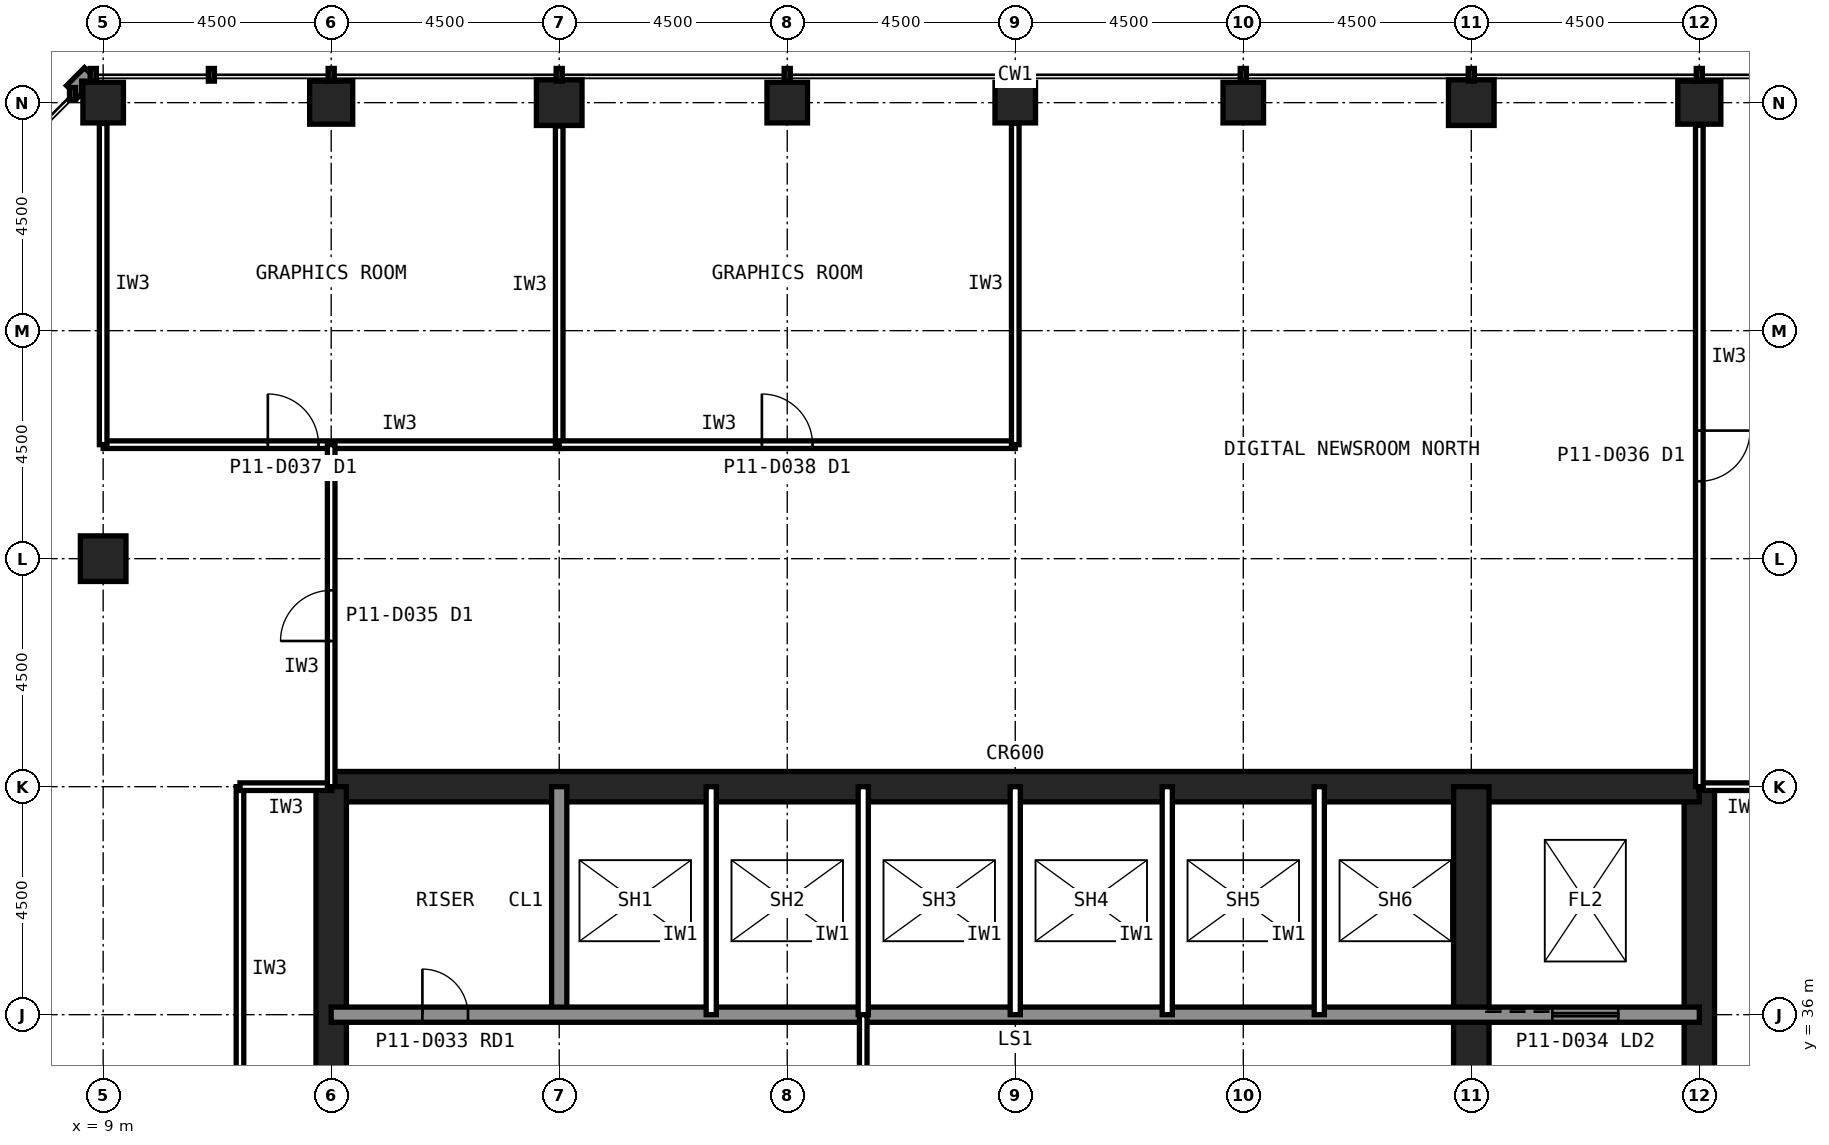
"""IFC4 building model, lengths in metres.
Left out: names, types, materials, properties, quantities, classifications, styles, units other than length and angle.
Written with IfcOpenShell. Run it as: python <this file> out.ifc"""

import sys

from ifc_helpers import new_model, si_unit, direction, frame, frame_2d, origin, origin_2d, place, context, subcontext, project, spatial, rectangle, hollow_rectangle, extrude, element, fill, save


model = new_model("IFC4")
c1 = context("Model", 3, precision=1e-05, world=origin(), true_north=direction((0.0, 1.0)))
c2 = subcontext(c1, "Body", "Model", "MODEL_VIEW")
j1 = project(units=[si_unit("LENGTHUNIT", "METRE"), si_unit("PLANEANGLEUNIT", "RADIAN")], contexts=[c1])
p1 = place(None, origin())
s1 = spatial("IfcSite", under=j1, at=p1, CompositionType="ELEMENT")
p2 = place(p1, origin())
s2 = spatial("IfcBuilding", under=s1, at=p2, CompositionType="ELEMENT")
p3 = place(p2, frame((0.0, 0.0, 45.8)))
s3 = spatial("IfcBuildingStorey", under=s2, at=p3, CompositionType="ELEMENT", Elevation=45.8)
p4 = place(p3, frame((40.5, 54.0, 0.0), z_axis=(0.0, 0.0, 1.0), x_axis=(1.0, 0.0, 0.0)))
e1 = element("IfcColumn", 1, at=p4, inside=s3, PredefinedType="COLUMN", context=c2, shape_type="SweptSolid", body=[
    extrude(hollow_rectangle(XDim=0.85, YDim=0.85, WallThickness=0.05, at=origin_2d()), origin(), (0.0, 0.0, 1.0), 4.2),
])
p5 = place(p3, frame((36.0, 54.0, 0.0), z_axis=(0.0, 0.0, 1.0), x_axis=(1.0, 0.0, 0.0)))
e2 = element("IfcColumn", 2, at=p5, inside=s3, PredefinedType="COLUMN", context=c2, shape_type="SweptSolid", body=[
    extrude(hollow_rectangle(XDim=0.9, YDim=0.9, WallThickness=0.063, at=origin_2d()), origin(), (0.0, 0.0, 1.0), 4.2),
])
for number, where, z_axis, x_axis in (
    (3, (31.5, 54.0, 0.0), (0.0, 0.0, 1.0), (1.0, 0.0, 0.0)),
    (4, (27.0, 54.0, 0.0), (0.0, 0.0, 1.0), (1.0, 0.0, 0.0)),
    (5, (22.5, 54.0, 0.0), (0.0, 0.0, 1.0), (1.0, 0.0, 0.0)),
):
    element("IfcColumn", number, at=place(p3, frame(where, z_axis=z_axis, x_axis=x_axis)), inside=s3, PredefinedType="COLUMN", context=c2, shape_type="SweptSolid", body=[
        extrude(hollow_rectangle(XDim=0.8, YDim=0.8, WallThickness=0.045, at=origin_2d()), origin(), (0.0, 0.0, 1.0), 4.2),
    ])
p6 = place(p3, frame((18.0, 54.0, 0.0), z_axis=(0.0, 0.0, 1.0), x_axis=(1.0, 0.0, 0.0)))
e6 = element("IfcColumn", 6, at=p6, inside=s3, PredefinedType="COLUMN", context=c2, shape_type="SweptSolid", body=[
    extrude(hollow_rectangle(XDim=0.9, YDim=0.9, WallThickness=0.063, at=origin_2d()), origin(), (0.0, 0.0, 1.0), 4.2),
])
p7 = place(p3, frame((13.5, 54.0, 0.0), z_axis=(0.0, 0.0, 1.0), x_axis=(1.0, 0.0, 0.0)))
e7 = element("IfcColumn", 7, at=p7, inside=s3, PredefinedType="COLUMN", context=c2, shape_type="SweptSolid", body=[
    extrude(hollow_rectangle(XDim=0.85, YDim=0.85, WallThickness=0.05, at=origin_2d()), origin(), (0.0, 0.0, 1.0), 4.2),
])
p8 = place(p3, frame((9.0, 54.0, 0.0), z_axis=(0.0, 0.0, 1.0), x_axis=(1.0, 0.0, 0.0)))
e8 = element("IfcColumn", 8, at=p8, inside=s3, PredefinedType="COLUMN", context=c2, shape_type="SweptSolid", body=[
    extrude(hollow_rectangle(XDim=0.8, YDim=0.8, WallThickness=0.045, at=origin_2d()), origin(), (0.0, 0.0, 1.0), 4.2),
])
p9 = place(p3, frame((9.0, 45.0, 0.0), z_axis=(0.0, 0.0, 1.0), x_axis=(1.0, 0.0, 0.0)))
e9 = element("IfcColumn", 9, at=p9, inside=s3, PredefinedType="COLUMN", context=c2, shape_type="SweptSolid", body=[
    extrude(hollow_rectangle(XDim=0.9, YDim=0.9, WallThickness=0.063, at=origin_2d()), origin(), (0.0, 0.0, 1.0), 4.2),
])
p10 = place(p3, frame((40.5, 13.5, 0.0), z_axis=(0.0, 0.0, 1.0), x_axis=(0.0, 1.0, 0.0)))
e10 = element("IfcWall", 10, at=p10, inside=s3, PredefinedType="SHEAR", context=c2, shape_type="SweptSolid", body=[
    extrude(rectangle(XDim=27.0, YDim=0.6, at=frame_2d((13.5, 0.0))), origin(), (0.0, 0.0, 1.0), 4.2),
])
p11 = place(p10, frame((5.85, 0.0, 0.0)))
e11 = element("IfcOpeningElement", 11, at=p11, cuts=e10, PredefinedType="OPENING", context=c2, shape_type="SweptSolid", body=[
    extrude(rectangle(XDim=1.8, YDim=2.1, at=frame_2d((0.9, 1.05))), frame((0.0, 0.31, 0.0), z_axis=(0.0, -1.0, 0.0), x_axis=(1.0, 0.0, 0.0)), (0.0, 0.0, 1.0), 0.62),
])
p12 = place(p10, frame((19.65, 0.0, 0.0)))
e12 = element("IfcOpeningElement", 12, at=p12, cuts=e10, PredefinedType="OPENING", context=c2, shape_type="SweptSolid", body=[
    extrude(rectangle(XDim=1.2, YDim=2.1, at=frame_2d((0.6, 1.05))), frame((0.0, 0.31, 0.0), z_axis=(0.0, -1.0, 0.0), x_axis=(1.0, 0.0, 0.0)), (0.0, 0.0, 1.0), 0.62),
])
p13 = place(p3, frame((40.5, 40.5, 0.0), z_axis=(0.0, 0.0, 1.0), x_axis=(-1.0, 0.0, 0.0)))
e13 = element("IfcWall", 13, at=p13, inside=s3, PredefinedType="SHEAR", context=c2, shape_type="SweptSolid", body=[
    extrude(rectangle(XDim=27.0, YDim=0.6, at=frame_2d((13.5, 0.0))), origin(), (0.0, 0.0, 1.0), 4.2),
])
p14 = place(p3, frame((13.5, 40.5, 0.0), z_axis=(0.0, 0.0, 1.0), x_axis=(0.0, -1.0, 0.0)))
e14 = element("IfcWall", 14, at=p14, inside=s3, PredefinedType="SHEAR", context=c2, shape_type="SweptSolid", body=[
    extrude(rectangle(XDim=27.0, YDim=0.6, at=frame_2d((13.5, 0.0))), origin(), (0.0, 0.0, 1.0), 4.2),
])
p15 = place(p14, frame((19.65, 0.0, 0.0)))
e15 = element("IfcOpeningElement", 15, at=p15, cuts=e14, PredefinedType="OPENING", context=c2, shape_type="SweptSolid", body=[
    extrude(rectangle(XDim=1.2, YDim=2.1, at=frame_2d((0.6, 1.05))), frame((0.0, 0.31, 0.0), z_axis=(0.0, -1.0, 0.0), x_axis=(1.0, 0.0, 0.0)), (0.0, 0.0, 1.0), 0.62),
])
p16 = place(p14, frame((5.85, 0.0, 0.0)))
e16 = element("IfcOpeningElement", 16, at=p16, cuts=e14, PredefinedType="OPENING", context=c2, shape_type="SweptSolid", body=[
    extrude(rectangle(XDim=1.8, YDim=2.1, at=frame_2d((0.9, 1.05))), frame((0.0, 0.31, 0.0), z_axis=(0.0, -1.0, 0.0), x_axis=(1.0, 0.0, 0.0)), (0.0, 0.0, 1.0), 0.62),
])
p17 = place(p3, frame((18.0, 36.0, 0.0), z_axis=(0.0, 0.0, 1.0), x_axis=(0.0, 1.0, 0.0)))
e17 = element("IfcWall", 17, at=p17, inside=s3, PredefinedType="SOLIDWALL", context=c2, shape_type="SweptSolid", body=[
    extrude(rectangle(XDim=4.5, YDim=0.3, at=frame_2d((2.25, 0.0))), origin(), (0.0, 0.0, 1.0), 4.04),
])
p18 = place(p3, frame((36.0, 22.5, 0.0), z_axis=(0.0, 0.0, 1.0), x_axis=(0.0, 1.0, 0.0)))
e18 = element("IfcWall", 18, at=p18, inside=s3, PredefinedType="SHEAR", context=c2, shape_type="SweptSolid", body=[
    extrude(rectangle(XDim=18.0, YDim=0.7, at=frame_2d((9.0, 0.0))), origin(), (0.0, 0.0, 1.0), 4.2),
])
p19 = place(p3, frame((13.5, 36.0, 0.0), z_axis=(0.0, 0.0, 1.0), x_axis=(1.0, 0.0, 0.0)))
e19 = element("IfcWall", 19, at=p19, inside=s3, PredefinedType="SOLIDWALL", context=c2, shape_type="SweptSolid", body=[
    extrude(rectangle(XDim=27.0, YDim=0.3, at=frame_2d((13.5, 0.0))), origin(), (0.0, 0.0, 1.0), 4.04),
])
p20 = place(p19, frame((1.8, 0.0, 0.0)))
e20 = element("IfcOpeningElement", 20, at=p20, cuts=e19, PredefinedType="OPENING", context=c2, shape_type="SweptSolid", body=[
    extrude(rectangle(XDim=0.9, YDim=2.1, at=frame_2d((0.45, 1.05))), frame((0.0, 0.16, 0.0), z_axis=(0.0, -1.0, 0.0), x_axis=(1.0, 0.0, 0.0)), (0.0, 0.0, 1.0), 0.32),
])
p21 = place(p19, frame((24.1, 0.0, 0.0)))
e21 = element("IfcOpeningElement", 21, at=p21, cuts=e19, PredefinedType="OPENING", context=c2, shape_type="SweptSolid", body=[
    extrude(rectangle(XDim=1.3, YDim=2.2, at=frame_2d((0.65, 1.1))), frame((0.0, 0.16, 0.0), z_axis=(0.0, -1.0, 0.0), x_axis=(1.0, 0.0, 0.0)), (0.0, 0.0, 1.0), 0.32),
])
for number, where, z_axis, x_axis in (
    (22, (21.0, 36.0, 0.0), (0.0, 0.0, 1.0), (0.0, 1.0, 0.0)),
    (23, (24.0, 36.0, 0.0), (0.0, 0.0, 1.0), (0.0, 1.0, 0.0)),
    (24, (27.0, 36.0, 0.0), (0.0, 0.0, 1.0), (0.0, 1.0, 0.0)),
    (25, (30.0, 36.0, 0.0), (0.0, 0.0, 1.0), (0.0, 1.0, 0.0)),
    (26, (33.0, 36.0, 0.0), (0.0, 0.0, 1.0), (0.0, 1.0, 0.0)),
):
    element("IfcWall", number, at=place(p3, frame(where, z_axis=z_axis, x_axis=x_axis)), inside=s3, PredefinedType="PARTITIONING", context=c2, shape_type="SweptSolid", body=[
        extrude(rectangle(XDim=4.5, YDim=0.2, at=frame_2d((2.25, 0.0))), origin(), (0.0, 0.0, 1.0), 4.04),
    ])
for number, where, z_axis, x_axis in (
    (27, (18.0, 33.3, 0.0), (0.0, 0.0, 1.0), (0.0, 1.0, 0.0)),
    (28, (22.5, 33.3, 0.0), (0.0, 0.0, 1.0), (0.0, 1.0, 0.0)),
    (29, (30.0, 33.3, 0.0), (0.0, 0.0, 1.0), (0.0, 1.0, 0.0)),
):
    element("IfcWall", number, at=place(p3, frame(where, z_axis=z_axis, x_axis=x_axis)), inside=s3, PredefinedType="PARTITIONING", context=c2, shape_type="SweptSolid", body=[
        extrude(rectangle(XDim=2.7, YDim=0.15, at=frame_2d((1.35, 0.0))), origin(), (0.0, 0.0, 1.0), 4.04),
    ])
p22 = place(p3, frame((42.3, 42.3, 0.0), z_axis=(0.0, 0.0, 1.0), x_axis=(-1.0, 0.0, 0.0)))
e30 = element("IfcWall", 30, at=p22, inside=s3, PredefinedType="PARTITIONING", context=c2, shape_type="SweptSolid", body=[
    extrude(rectangle(XDim=30.6, YDim=0.15, at=frame_2d((15.3, 0.0))), origin(), (0.0, 0.0, 1.0), 4.04),
])
p23 = place(p22, frame((14.8, 0.0, 0.0)))
e31 = element("IfcOpeningElement", 31, at=p23, cuts=e30, PredefinedType="OPENING", context=c2, shape_type="SweptSolid", body=[
    extrude(rectangle(XDim=1.0, YDim=2.1, at=frame_2d((0.5, 1.05))), frame((0.0, 0.085, 0.0), z_axis=(0.0, -1.0, 0.0), x_axis=(1.0, 0.0, 0.0)), (0.0, 0.0, 1.0), 0.17),
])
p24 = place(p3, frame((11.7, 42.3, 0.0), z_axis=(0.0, 0.0, 1.0), x_axis=(0.0, -1.0, 0.0)))
e32 = element("IfcWall", 32, at=p24, inside=s3, PredefinedType="PARTITIONING", context=c2, shape_type="SweptSolid", body=[
    extrude(rectangle(XDim=9.0, YDim=0.15, at=frame_2d((4.5, 0.0))), origin(), (0.0, 0.0, 1.0), 4.04),
])
p25 = place(p3, frame((9.0, 47.25, 0.0), z_axis=(0.0, 0.0, 1.0), x_axis=(1.0, 0.0, 0.0)))
e33 = element("IfcWall", 33, at=p25, inside=s3, PredefinedType="PARTITIONING", context=c2, shape_type="SweptSolid", body=[
    extrude(rectangle(XDim=9.0, YDim=0.15, at=frame_2d((4.5, 0.0))), origin(), (0.0, 0.0, 1.0), 4.04),
])
p26 = place(p25, frame((3.25, 0.0, 0.0)))
e34 = element("IfcOpeningElement", 34, at=p26, cuts=e33, PredefinedType="OPENING", context=c2, shape_type="SweptSolid", body=[
    extrude(rectangle(XDim=1.0, YDim=2.1, at=frame_2d((0.5, 1.05))), frame((0.0, 0.085, 0.0), z_axis=(0.0, -1.0, 0.0), x_axis=(1.0, 0.0, 0.0)), (0.0, 0.0, 1.0), 0.17),
])
p27 = place(p3, frame((18.0, 47.25, 0.0), z_axis=(0.0, 0.0, 1.0), x_axis=(0.0, 1.0, 0.0)))
e35 = element("IfcWall", 35, at=p27, inside=s3, PredefinedType="PARTITIONING", context=c2, shape_type="SweptSolid", body=[
    extrude(rectangle(XDim=6.29, YDim=0.15, at=frame_2d((3.145, 0.0))), origin(), (0.0, 0.0, 1.0), 3.189),
])
p28 = place(p3, frame((9.0, 53.59, 0.0), z_axis=(0.0, 0.0, 1.0), x_axis=(0.0, -1.0, 0.0)))
e36 = element("IfcWall", 36, at=p28, inside=s3, PredefinedType="PARTITIONING", context=c2, shape_type="SweptSolid", body=[
    extrude(rectangle(XDim=6.34, YDim=0.15, at=frame_2d((3.17, 0.0))), origin(), (0.0, 0.0, 1.0), 3.429),
])
p29 = place(p3, frame((18.0, 47.25, 0.0), z_axis=(0.0, 0.0, 1.0), x_axis=(1.0, 0.0, 0.0)))
e37 = element("IfcWall", 37, at=p29, inside=s3, PredefinedType="PARTITIONING", context=c2, shape_type="SweptSolid", body=[
    extrude(rectangle(XDim=9.0, YDim=0.15, at=frame_2d((4.5, 0.0))), origin(), (0.0, 0.0, 1.0), 4.04),
])
p30 = place(p29, frame((4.0, 0.0, 0.0)))
e38 = element("IfcOpeningElement", 38, at=p30, cuts=e37, PredefinedType="OPENING", context=c2, shape_type="SweptSolid", body=[
    extrude(rectangle(XDim=1.0, YDim=2.1, at=frame_2d((0.5, 1.05))), frame((0.0, 0.085, 0.0), z_axis=(0.0, -1.0, 0.0), x_axis=(1.0, 0.0, 0.0)), (0.0, 0.0, 1.0), 0.17),
])
p31 = place(p3, frame((27.0, 47.25, 0.0), z_axis=(0.0, 0.0, 1.0), x_axis=(0.0, 1.0, 0.0)))
e39 = element("IfcWall", 39, at=p31, inside=s3, PredefinedType="PARTITIONING", context=c2, shape_type="SweptSolid", body=[
    extrude(rectangle(XDim=6.34, YDim=0.15, at=frame_2d((3.17, 0.0))), origin(), (0.0, 0.0, 1.0), 3.189),
])
p32 = place(p3, frame((40.5, 53.555, 0.0), z_axis=(0.0, 0.0, 1.0), x_axis=(0.0, -1.0, 0.0)))
e40 = element("IfcWall", 40, at=p32, inside=s3, PredefinedType="PARTITIONING", context=c2, shape_type="SweptSolid", body=[
    extrude(rectangle(XDim=11.255, YDim=0.15, at=frame_2d((5.627, 0.0))), origin(), (0.0, 0.0, 1.0), 3.189),
])
p33 = place(p32, frame((5.127, 0.0, 0.0)))
e41 = element("IfcOpeningElement", 41, at=p33, cuts=e40, PredefinedType="OPENING", context=c2, shape_type="SweptSolid", body=[
    extrude(rectangle(XDim=1.0, YDim=2.1, at=frame_2d((0.5, 1.05))), frame((0.0, 0.085, 0.0), z_axis=(0.0, -1.0, 0.0), x_axis=(1.0, 0.0, 0.0)), (0.0, 0.0, 1.0), 0.17),
])
p34 = place(p3, frame((13.5, 42.3, 0.0), z_axis=(0.0, 0.0, 1.0), x_axis=(0.0, 1.0, 0.0)))
e42 = element("IfcWall", 42, at=p34, inside=s3, PredefinedType="PARTITIONING", context=c2, shape_type="SweptSolid", body=[
    extrude(rectangle(XDim=4.95, YDim=0.15, at=frame_2d((2.475, 0.0))), origin(), (0.0, 0.0, 1.0), 3.189),
])
p35 = place(p34, frame((1.975, 0.0, 0.0)))
e43 = element("IfcOpeningElement", 43, at=p35, cuts=e42, PredefinedType="OPENING", context=c2, shape_type="SweptSolid", body=[
    extrude(rectangle(XDim=1.0, YDim=2.1, at=frame_2d((0.5, 1.05))), frame((0.0, 0.085, 0.0), z_axis=(0.0, -1.0, 0.0), x_axis=(1.0, 0.0, 0.0)), (0.0, 0.0, 1.0), 0.17),
])
p36 = place(p20, origin())
e44 = element("IfcDoor", 44, at=p36, inside=s3, OperationType="SINGLE_SWING_LEFT", PredefinedType="DOOR", context=c2, shape_type="SweptSolid", body=[
    extrude(rectangle(XDim=0.9, YDim=2.1, at=frame_2d((0.45, 1.05))), frame((0.0, 0.025, 0.0), z_axis=(0.0, -1.0, 0.0), x_axis=(1.0, 0.0, 0.0)), (0.0, 0.0, 1.0), 0.05),
])
fill(e20, e44)
p37 = place(p21, origin())
e45 = element("IfcDoor", 45, at=p37, inside=s3, OperationType="SLIDING_TO_LEFT", PredefinedType="DOOR", context=c2, shape_type="SweptSolid", body=[
    extrude(rectangle(XDim=1.3, YDim=2.2, at=frame_2d((0.65, 1.1))), frame((0.0, 0.025, 0.0), z_axis=(0.0, -1.0, 0.0), x_axis=(1.0, 0.0, 0.0)), (0.0, 0.0, 1.0), 0.05),
])
fill(e21, e45)
p38 = place(p23, origin())
e46 = element("IfcDoor", 46, at=p38, inside=s3, OperationType="SINGLE_SWING_LEFT", PredefinedType="DOOR", context=c2, shape_type="SweptSolid", body=[
    extrude(rectangle(XDim=1.0, YDim=2.1, at=frame_2d((0.5, 1.05))), frame((0.0, 0.025, 0.0), z_axis=(0.0, -1.0, 0.0), x_axis=(1.0, 0.0, 0.0)), (0.0, 0.0, 1.0), 0.05),
])
fill(e31, e46)
p39 = place(p26, origin())
e47 = element("IfcDoor", 47, at=p39, inside=s3, OperationType="SINGLE_SWING_LEFT", PredefinedType="DOOR", context=c2, shape_type="SweptSolid", body=[
    extrude(rectangle(XDim=1.0, YDim=2.1, at=frame_2d((0.5, 1.05))), frame((0.0, 0.025, 0.0), z_axis=(0.0, -1.0, 0.0), x_axis=(1.0, 0.0, 0.0)), (0.0, 0.0, 1.0), 0.05),
])
fill(e34, e47)
p40 = place(p30, origin())
e48 = element("IfcDoor", 48, at=p40, inside=s3, OperationType="SINGLE_SWING_LEFT", PredefinedType="DOOR", context=c2, shape_type="SweptSolid", body=[
    extrude(rectangle(XDim=1.0, YDim=2.1, at=frame_2d((0.5, 1.05))), frame((0.0, 0.025, 0.0), z_axis=(0.0, -1.0, 0.0), x_axis=(1.0, 0.0, 0.0)), (0.0, 0.0, 1.0), 0.05),
])
fill(e38, e48)
p41 = place(p33, origin())
e49 = element("IfcDoor", 49, at=p41, inside=s3, OperationType="SINGLE_SWING_LEFT", PredefinedType="DOOR", context=c2, shape_type="SweptSolid", body=[
    extrude(rectangle(XDim=1.0, YDim=2.1, at=frame_2d((0.5, 1.05))), frame((0.0, 0.025, 0.0), z_axis=(0.0, -1.0, 0.0), x_axis=(1.0, 0.0, 0.0)), (0.0, 0.0, 1.0), 0.05),
])
fill(e41, e49)
p42 = place(p35, origin())
e50 = element("IfcDoor", 50, at=p42, inside=s3, OperationType="SINGLE_SWING_LEFT", PredefinedType="DOOR", context=c2, shape_type="SweptSolid", body=[
    extrude(rectangle(XDim=1.0, YDim=2.1, at=frame_2d((0.5, 1.05))), frame((0.0, 0.025, 0.0), z_axis=(0.0, -1.0, 0.0), x_axis=(1.0, 0.0, 0.0)), (0.0, 0.0, 1.0), 0.05),
])
fill(e43, e50)
save(model, sys.argv[1])
